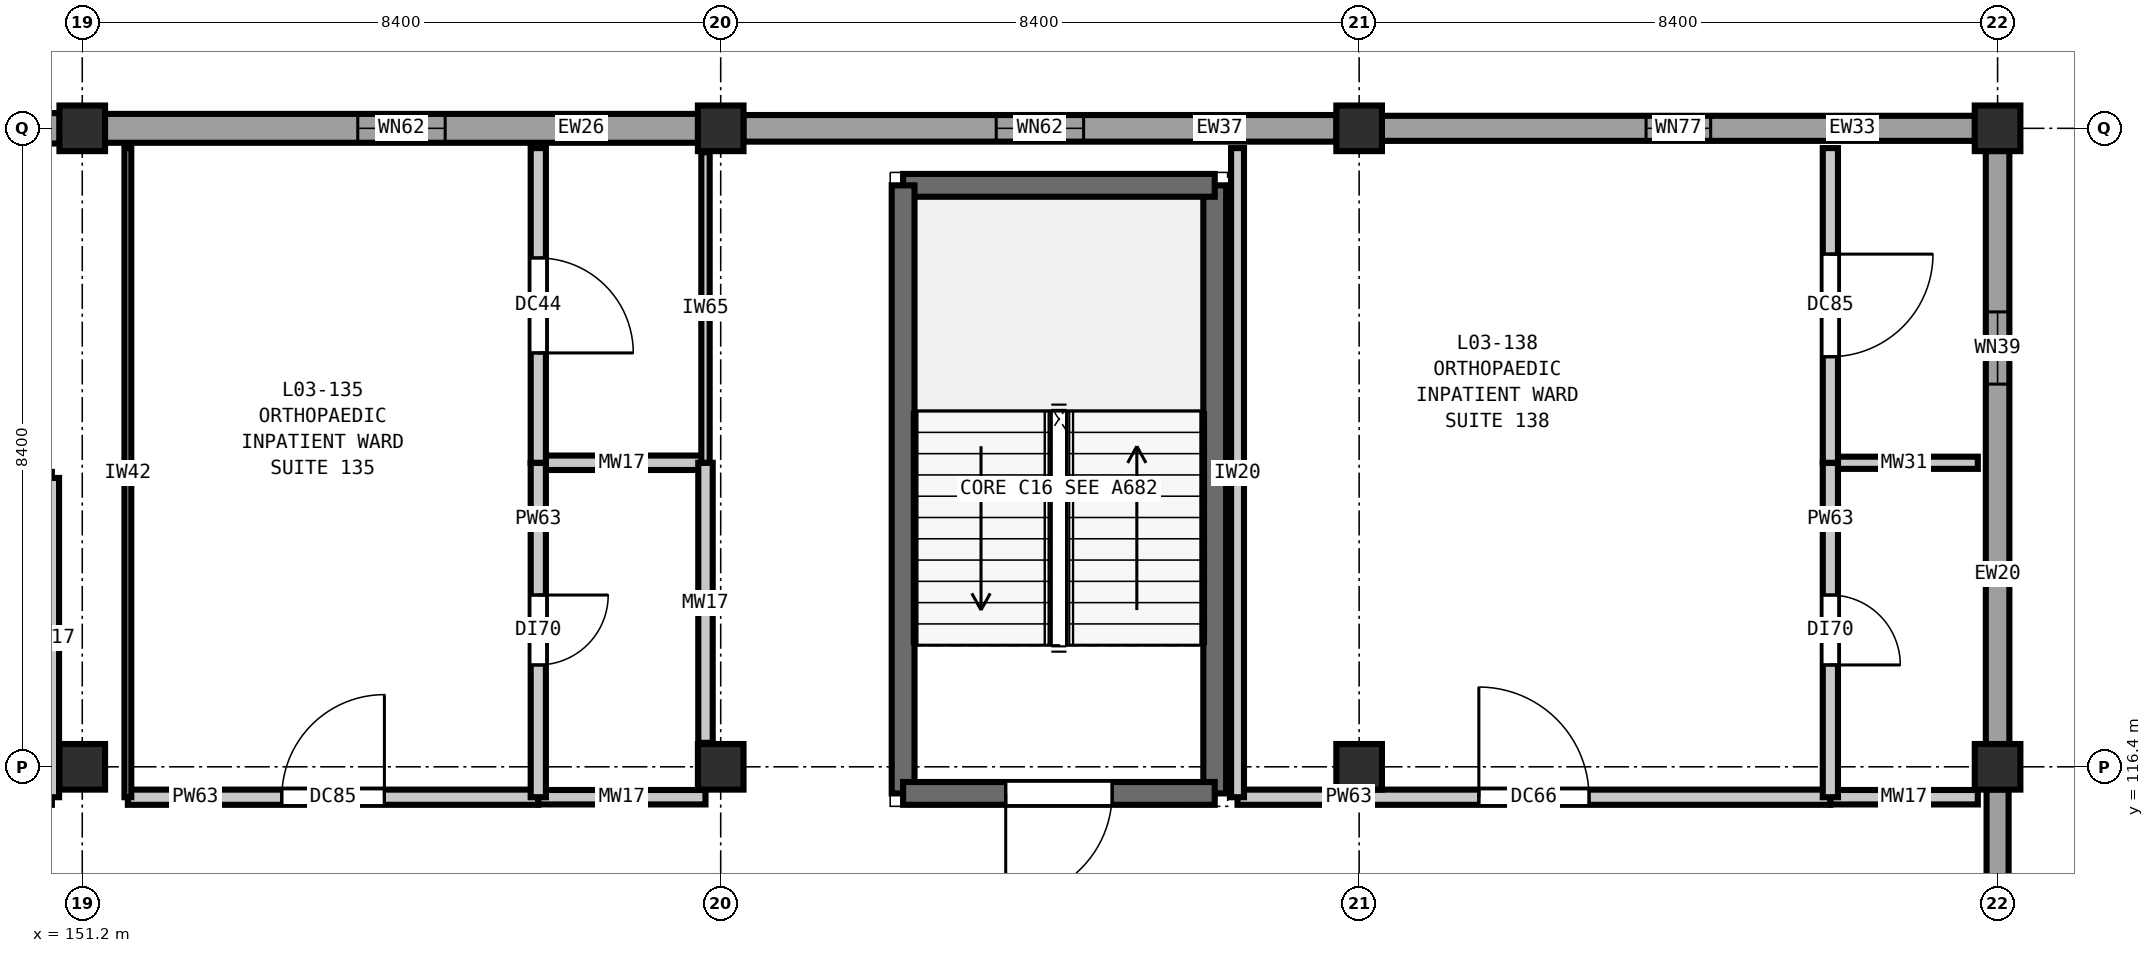
"""IFC4 building model, lengths in metres.
Left out: names, types, materials, properties, quantities, classifications, styles, units other than length and angle.
Written with IfcOpenShell. Run it as: python <this file> out.ifc"""

import sys

from ifc_helpers import new_model, si_unit, direction, frame, frame_2d, origin, origin_2d, place, context, subcontext, project, spatial, rectangle, extrude, element, fill, save


model = new_model("IFC4")
c1 = context("Model", 3, precision=1e-05, world=origin(), true_north=direction((0.0, 1.0)))
c2 = subcontext(c1, "Body", "Model", "MODEL_VIEW")
j1 = project(units=[si_unit("LENGTHUNIT", "METRE"), si_unit("PLANEANGLEUNIT", "RADIAN")], contexts=[c1])
p1 = place(None, origin())
s1 = spatial("IfcSite", under=j1, at=p1, CompositionType="ELEMENT")
p2 = place(p1, origin())
s2 = spatial("IfcBuilding", under=s1, at=p2, CompositionType="ELEMENT")
p3 = place(p2, frame((0.0, 0.0, 16.2)))
s3 = spatial("IfcBuildingStorey", under=s2, at=p3, CompositionType="ELEMENT", Elevation=16.2)
for number, where, z_axis, x_axis in (
    (1, (151.2, 116.4, 0.0), (0.0, 0.0, 1.0), (1.0, 0.0, 0.0)),
    (2, (151.2, 124.8, 0.0), (0.0, 0.0, 1.0), (1.0, 0.0, 0.0)),
    (3, (159.6, 116.4, 0.0), (0.0, 0.0, 1.0), (1.0, 0.0, 0.0)),
    (4, (159.6, 124.8, 0.0), (0.0, 0.0, 1.0), (1.0, 0.0, 0.0)),
    (5, (168.0, 116.4, 0.0), (0.0, 0.0, 1.0), (1.0, 0.0, 0.0)),
    (6, (168.0, 124.8, 0.0), (0.0, 0.0, 1.0), (1.0, 0.0, 0.0)),
    (7, (176.4, 116.4, 0.0), (0.0, 0.0, 1.0), (1.0, 0.0, 0.0)),
    (8, (176.4, 124.8, 0.0), (0.0, 0.0, 1.0), (1.0, 0.0, 0.0)),
):
    element("IfcColumn", number, at=place(p3, frame(where, z_axis=z_axis, x_axis=x_axis)), inside=s3, PredefinedType="COLUMN", context=c2, shape_type="SweptSolid", body=[
        extrude(rectangle(XDim=0.6, YDim=0.6, at=origin_2d()), origin(), (0.0, 0.0, 1.0), 4.2),
    ])
p4 = place(p3, frame((143.098, 124.8, 0.0), z_axis=(0.0, 0.0, 1.0), x_axis=(1.0, 0.0, 0.0)))
e9 = element("IfcWall", 9, at=p4, inside=s3, PredefinedType="SOLIDWALL", context=c2, shape_type="SweptSolid", body=[
    extrude(rectangle(XDim=7.804, YDim=0.4, at=frame_2d((3.902, 0.0))), origin(), (0.0, 0.0, 1.0), 3.48),
])
p5 = place(p4, frame((3.327, 0.0, 0.9)))
e10 = element("IfcOpeningElement", 10, at=p5, cuts=e9, PredefinedType="OPENING", context=c2, shape_type="SweptSolid", body=[
    extrude(rectangle(XDim=1.15, YDim=1.4, at=frame_2d((0.575, 0.7))), frame((0.0, 0.21, 0.0), z_axis=(0.0, -1.0, 0.0), x_axis=(1.0, 0.0, 0.0)), (0.0, 0.0, 1.0), 0.42),
])
p6 = place(p3, frame((151.498, 124.8, 0.0), z_axis=(0.0, 0.0, 1.0), x_axis=(1.0, 0.0, 0.0)))
e11 = element("IfcWall", 11, at=p6, inside=s3, PredefinedType="SOLIDWALL", context=c2, shape_type="SweptSolid", body=[
    extrude(rectangle(XDim=7.804, YDim=0.38, at=frame_2d((3.902, 0.0))), origin(), (0.0, 0.0, 1.0), 3.48),
])
p7 = place(p6, frame((3.327, 0.0, 0.9)))
e12 = element("IfcOpeningElement", 12, at=p7, cuts=e11, PredefinedType="OPENING", context=c2, shape_type="SweptSolid", body=[
    extrude(rectangle(XDim=1.15, YDim=1.4, at=frame_2d((0.575, 0.7))), frame((0.0, 0.2, 0.0), z_axis=(0.0, -1.0, 0.0), x_axis=(1.0, 0.0, 0.0)), (0.0, 0.0, 1.0), 0.4),
])
p8 = place(p3, frame((159.898, 124.8, 0.0), z_axis=(0.0, 0.0, 1.0), x_axis=(1.0, 0.0, 0.0)))
e13 = element("IfcWall", 13, at=p8, inside=s3, PredefinedType="SOLIDWALL", context=c2, shape_type="SweptSolid", body=[
    extrude(rectangle(XDim=7.804, YDim=0.35, at=frame_2d((3.902, 0.0))), origin(), (0.0, 0.0, 1.0), 3.48),
])
p9 = place(p8, frame((3.327, 0.0, 0.9)))
e14 = element("IfcOpeningElement", 14, at=p9, cuts=e13, PredefinedType="OPENING", context=c2, shape_type="SweptSolid", body=[
    extrude(rectangle(XDim=1.15, YDim=1.4, at=frame_2d((0.575, 0.7))), frame((0.0, 0.185, 0.0), z_axis=(0.0, -1.0, 0.0), x_axis=(1.0, 0.0, 0.0)), (0.0, 0.0, 1.0), 0.37),
])
p10 = place(p3, frame((168.298, 124.8, 0.0), z_axis=(0.0, 0.0, 1.0), x_axis=(1.0, 0.0, 0.0)))
e15 = element("IfcWall", 15, at=p10, inside=s3, PredefinedType="SOLIDWALL", context=c2, shape_type="SweptSolid", body=[
    extrude(rectangle(XDim=7.804, YDim=0.33, at=frame_2d((3.902, 0.0))), origin(), (0.0, 0.0, 1.0), 3.48),
])
p11 = place(p10, frame((3.477, 0.0, 0.9)))
e16 = element("IfcOpeningElement", 16, at=p11, cuts=e15, PredefinedType="OPENING", context=c2, shape_type="SweptSolid", body=[
    extrude(rectangle(XDim=0.85, YDim=1.4, at=frame_2d((0.425, 0.7))), frame((0.0, 0.175, 0.0), z_axis=(0.0, -1.0, 0.0), x_axis=(1.0, 0.0, 0.0)), (0.0, 0.0, 1.0), 0.35),
])
p12 = place(p3, frame((176.4, 124.502, 0.0), z_axis=(0.0, 0.0, 1.0), x_axis=(0.0, -1.0, 0.0)))
e17 = element("IfcWall", 17, at=p12, inside=s3, PredefinedType="SOLIDWALL", context=c2, shape_type="SweptSolid", body=[
    extrude(rectangle(XDim=7.804, YDim=0.31, at=frame_2d((3.902, 0.0))), origin(), (0.0, 0.0, 1.0), 3.48),
])
p13 = place(p12, frame((2.117, 0.0, 0.9)))
e18 = element("IfcOpeningElement", 18, at=p13, cuts=e17, PredefinedType="OPENING", context=c2, shape_type="SweptSolid", body=[
    extrude(rectangle(XDim=0.95, YDim=1.4, at=frame_2d((0.475, 0.7))), frame((0.0, 0.165, 0.0), z_axis=(0.0, -1.0, 0.0), x_axis=(1.0, 0.0, 0.0)), (0.0, 0.0, 1.0), 0.33),
])
p14 = place(p3, frame((176.4, 116.102, 0.0), z_axis=(0.0, 0.0, 1.0), x_axis=(0.0, -1.0, 0.0)))
e19 = element("IfcWall", 19, at=p14, inside=s3, PredefinedType="SOLIDWALL", context=c2, shape_type="SweptSolid", body=[
    extrude(rectangle(XDim=6.604, YDim=0.29, at=frame_2d((3.302, 0.0))), origin(), (0.0, 0.0, 1.0), 3.48),
])
p15 = place(p14, frame((3.801, 0.0, 0.9)))
e20 = element("IfcOpeningElement", 20, at=p15, cuts=e19, PredefinedType="OPENING", context=c2, shape_type="SweptSolid", body=[
    extrude(rectangle(XDim=1.05, YDim=1.4, at=frame_2d((0.525, 0.7))), frame((0.0, 0.155, 0.0), z_axis=(0.0, -1.0, 0.0), x_axis=(1.0, 0.0, 0.0)), (0.0, 0.0, 1.0), 0.31),
])
p16 = place(p3, frame((166.1, 116.05, 0.0), z_axis=(0.0, 0.0, 1.0), x_axis=(0.0, 1.0, 0.0)))
e21 = element("IfcWall", 21, at=p16, inside=s3, PredefinedType="SHEAR", context=c2, shape_type="SweptSolid", body=[
    extrude(rectangle(XDim=8.0, YDim=0.3, at=frame_2d((4.0, 0.0))), origin(), (0.0, 0.0, 1.0), 4.2),
])
p17 = place(p3, frame((166.1, 124.05, 0.0), z_axis=(0.0, 0.0, 1.0), x_axis=(-1.0, 0.0, 0.0)))
e22 = element("IfcWall", 22, at=p17, inside=s3, PredefinedType="SHEAR", context=c2, shape_type="SweptSolid", body=[
    extrude(rectangle(XDim=4.1, YDim=0.3, at=frame_2d((2.05, 0.0))), origin(), (0.0, 0.0, 1.0), 4.2),
])
p18 = place(p3, frame((162.0, 124.05, 0.0), z_axis=(0.0, 0.0, 1.0), x_axis=(0.0, -1.0, 0.0)))
e23 = element("IfcWall", 23, at=p18, inside=s3, PredefinedType="SHEAR", context=c2, shape_type="SweptSolid", body=[
    extrude(rectangle(XDim=8.0, YDim=0.3, at=frame_2d((4.0, 0.0))), origin(), (0.0, 0.0, 1.0), 4.2),
])
p19 = place(p3, frame((162.0, 116.05, 0.0), z_axis=(0.0, 0.0, 1.0), x_axis=(1.0, 0.0, 0.0)))
e24 = element("IfcWall", 24, at=p19, inside=s3, PredefinedType="SHEAR", context=c2, shape_type="SweptSolid", body=[
    extrude(rectangle(XDim=4.1, YDim=0.3, at=frame_2d((2.05, 0.0))), origin(), (0.0, 0.0, 1.0), 4.2),
])
p20 = place(p19, frame((1.35, 0.0, 0.0)))
e25 = element("IfcOpeningElement", 25, at=p20, cuts=e24, PredefinedType="OPENING", context=c2, shape_type="SweptSolid", body=[
    extrude(rectangle(XDim=1.4, YDim=2.2, at=frame_2d((0.7, 1.1))), frame((0.0, 0.16, 0.0), z_axis=(0.0, -1.0, 0.0), x_axis=(1.0, 0.0, 0.0)), (0.0, 0.0, 1.0), 0.32),
])
p21 = place(p3, frame((151.8, 116.0, 0.0), z_axis=(0.0, 0.0, 1.0), x_axis=(1.0, 0.0, 0.0)))
e26 = element("IfcWall", 26, at=p21, inside=s3, PredefinedType="PARTITIONING", context=c2, shape_type="SweptSolid", body=[
    extrude(rectangle(XDim=5.4, YDim=0.2, at=frame_2d((2.7, 0.0))), origin(), (0.0, 0.0, 1.0), 3.89),
])
p22 = place(p21, frame((2.025, 0.0, 0.0)))
e27 = element("IfcOpeningElement", 27, at=p22, cuts=e26, PredefinedType="OPENING", context=c2, shape_type="SweptSolid", body=[
    extrude(rectangle(XDim=1.35, YDim=2.2, at=frame_2d((0.675, 1.1))), frame((0.0, 0.11, 0.0), z_axis=(0.0, -1.0, 0.0), x_axis=(1.0, 0.0, 0.0)), (0.0, 0.0, 1.0), 0.22),
])
p23 = place(p3, frame((157.2, 116.0, 0.0), z_axis=(0.0, 0.0, 1.0), x_axis=(1.0, 0.0, 0.0)))
e28 = element("IfcWall", 28, at=p23, inside=s3, PredefinedType="PLUMBINGWALL", context=c2, shape_type="SweptSolid", body=[
    extrude(rectangle(XDim=2.2, YDim=0.19, at=frame_2d((1.1, 0.0))), origin(), (0.0, 0.0, 1.0), 3.89),
])
p24 = place(p3, frame((166.4, 116.0, 0.0), z_axis=(0.0, 0.0, 1.0), x_axis=(1.0, 0.0, 0.0)))
e29 = element("IfcWall", 29, at=p24, inside=s3, PredefinedType="PARTITIONING", context=c2, shape_type="SweptSolid", body=[
    extrude(rectangle(XDim=7.8, YDim=0.2, at=frame_2d((3.9, 0.0))), origin(), (0.0, 0.0, 1.0), 3.89),
])
p25 = place(p24, frame((3.175, 0.0, 0.0)))
e30 = element("IfcOpeningElement", 30, at=p25, cuts=e29, PredefinedType="OPENING", context=c2, shape_type="SweptSolid", body=[
    extrude(rectangle(XDim=1.45, YDim=2.25, at=frame_2d((0.725, 1.125))), frame((0.0, 0.11, 0.0), z_axis=(0.0, -1.0, 0.0), x_axis=(1.0, 0.0, 0.0)), (0.0, 0.0, 1.0), 0.22),
])
p26 = place(p3, frame((174.2, 116.0, 0.0), z_axis=(0.0, 0.0, 1.0), x_axis=(1.0, 0.0, 0.0)))
e31 = element("IfcWall", 31, at=p26, inside=s3, PredefinedType="PLUMBINGWALL", context=c2, shape_type="SweptSolid", body=[
    extrude(rectangle(XDim=1.94, YDim=0.19, at=frame_2d((0.97, 0.0))), origin(), (0.0, 0.0, 1.0), 3.89),
])
p27 = place(p3, frame((157.2, 120.4, 0.0), z_axis=(0.0, 0.0, 1.0), x_axis=(1.0, 0.0, 0.0)))
e32 = element("IfcWall", 32, at=p27, inside=s3, PredefinedType="PLUMBINGWALL", context=c2, shape_type="SweptSolid", body=[
    extrude(rectangle(XDim=2.2, YDim=0.19, at=frame_2d((1.1, 0.0))), origin(), (0.0, 0.0, 1.0), 3.89),
])
p28 = place(p3, frame((174.2, 120.4, 0.0), z_axis=(0.0, 0.0, 1.0), x_axis=(1.0, 0.0, 0.0)))
e33 = element("IfcWall", 33, at=p28, inside=s3, PredefinedType="PLUMBINGWALL", context=c2, shape_type="SweptSolid", body=[
    extrude(rectangle(XDim=1.94, YDim=0.16, at=frame_2d((0.97, 0.0))), origin(), (0.0, 0.0, 1.0), 3.89),
])
p29 = place(p3, frame((150.8, 116.0, 0.0), z_axis=(0.0, 0.0, 1.0), x_axis=(0.0, 1.0, 0.0)))
e34 = element("IfcWall", 34, at=p29, inside=s3, PredefinedType="PLUMBINGWALL", context=c2, shape_type="SweptSolid", body=[
    extrude(rectangle(XDim=4.2, YDim=0.19, at=frame_2d((2.1, 0.0))), origin(), (0.0, 0.0, 1.0), 3.89),
])
p30 = place(p3, frame((151.8, 116.0, 0.0), z_axis=(0.0, 0.0, 1.0), x_axis=(0.0, 1.0, 0.0)))
e35 = element("IfcWall", 35, at=p30, inside=s3, PredefinedType="PARTITIONING", context=c2, shape_type="SweptSolid", body=[
    extrude(rectangle(XDim=8.54, YDim=0.09, at=frame_2d((4.27, 0.0))), origin(), (0.0, 0.0, 1.0), 3.89),
])
p31 = place(p3, frame((157.2, 116.0, 0.0), z_axis=(0.0, 0.0, 1.0), x_axis=(0.0, 1.0, 0.0)))
e36 = element("IfcWall", 36, at=p31, inside=s3, PredefinedType="PARTITIONING", context=c2, shape_type="SweptSolid", body=[
    extrude(rectangle(XDim=4.4, YDim=0.2, at=frame_2d((2.2, 0.0))), origin(), (0.0, 0.0, 1.0), 3.89),
])
p32 = place(p31, frame((1.74, 0.0, 0.0)))
e37 = element("IfcOpeningElement", 37, at=p32, cuts=e36, PredefinedType="OPENING", context=c2, shape_type="SweptSolid", body=[
    extrude(rectangle(XDim=0.92, YDim=2.1, at=frame_2d((0.46, 1.05))), frame((0.0, 0.11, 0.0), z_axis=(0.0, -1.0, 0.0), x_axis=(1.0, 0.0, 0.0)), (0.0, 0.0, 1.0), 0.22),
])
p33 = place(p3, frame((157.2, 120.4, 0.0), z_axis=(0.0, 0.0, 1.0), x_axis=(0.0, 1.0, 0.0)))
e38 = element("IfcWall", 38, at=p33, inside=s3, PredefinedType="PARTITIONING", context=c2, shape_type="SweptSolid", body=[
    extrude(rectangle(XDim=4.14, YDim=0.2, at=frame_2d((2.07, 0.0))), origin(), (0.0, 0.0, 1.0), 3.89),
])
p34 = place(p33, frame((1.445, 0.0, 0.0)))
e39 = element("IfcOpeningElement", 39, at=p34, cuts=e38, PredefinedType="OPENING", context=c2, shape_type="SweptSolid", body=[
    extrude(rectangle(XDim=1.25, YDim=2.15, at=frame_2d((0.625, 1.075))), frame((0.0, 0.11, 0.0), z_axis=(0.0, -1.0, 0.0), x_axis=(1.0, 0.0, 0.0)), (0.0, 0.0, 1.0), 0.22),
])
p35 = place(p3, frame((159.4, 116.715, 0.0), z_axis=(0.0, 0.0, 1.0), x_axis=(0.0, 1.0, 0.0)))
e40 = element("IfcWall", 40, at=p35, inside=s3, PredefinedType="PLUMBINGWALL", context=c2, shape_type="SweptSolid", body=[
    extrude(rectangle(XDim=3.685, YDim=0.19, at=frame_2d((1.842, 0.0))), origin(), (0.0, 0.0, 1.0), 3.585),
])
p36 = place(p3, frame((159.4, 120.4, 0.0), z_axis=(0.0, 0.0, 1.0), x_axis=(0.0, 1.0, 0.0)))
e41 = element("IfcWall", 41, at=p36, inside=s3, PredefinedType="PARTITIONING", context=c2, shape_type="SweptSolid", body=[
    extrude(rectangle(XDim=4.085, YDim=0.11, at=frame_2d((2.042, 0.0))), origin(), (0.0, 0.0, 1.0), 3.585),
])
p37 = place(p3, frame((166.4, 116.0, 0.0), z_axis=(0.0, 0.0, 1.0), x_axis=(0.0, 1.0, 0.0)))
e42 = element("IfcWall", 42, at=p37, inside=s3, PredefinedType="PARTITIONING", context=c2, shape_type="SweptSolid", body=[
    extrude(rectangle(XDim=8.54, YDim=0.17, at=frame_2d((4.27, 0.0))), origin(), (0.0, 0.0, 1.0), 3.89),
])
p38 = place(p3, frame((174.2, 116.0, 0.0), z_axis=(0.0, 0.0, 1.0), x_axis=(0.0, 1.0, 0.0)))
e43 = element("IfcWall", 43, at=p38, inside=s3, PredefinedType="PARTITIONING", context=c2, shape_type="SweptSolid", body=[
    extrude(rectangle(XDim=4.4, YDim=0.2, at=frame_2d((2.2, 0.0))), origin(), (0.0, 0.0, 1.0), 3.89),
])
p39 = place(p38, frame((1.74, 0.0, 0.0)))
e44 = element("IfcOpeningElement", 44, at=p39, cuts=e43, PredefinedType="OPENING", context=c2, shape_type="SweptSolid", body=[
    extrude(rectangle(XDim=0.92, YDim=2.1, at=frame_2d((0.46, 1.05))), frame((0.0, 0.11, 0.0), z_axis=(0.0, -1.0, 0.0), x_axis=(1.0, 0.0, 0.0)), (0.0, 0.0, 1.0), 0.22),
])
p40 = place(p3, frame((174.2, 120.4, 0.0), z_axis=(0.0, 0.0, 1.0), x_axis=(0.0, 1.0, 0.0)))
e45 = element("IfcWall", 45, at=p40, inside=s3, PredefinedType="PARTITIONING", context=c2, shape_type="SweptSolid", body=[
    extrude(rectangle(XDim=4.14, YDim=0.2, at=frame_2d((2.07, 0.0))), origin(), (0.0, 0.0, 1.0), 3.89),
])
p41 = place(p40, frame((1.395, 0.0, 0.0)))
e46 = element("IfcOpeningElement", 46, at=p41, cuts=e45, PredefinedType="OPENING", context=c2, shape_type="SweptSolid", body=[
    extrude(rectangle(XDim=1.35, YDim=2.2, at=frame_2d((0.675, 1.1))), frame((0.0, 0.11, 0.0), z_axis=(0.0, -1.0, 0.0), x_axis=(1.0, 0.0, 0.0)), (0.0, 0.0, 1.0), 0.22),
])
p42 = place(p7, origin())
e47 = element("IfcWindow", 47, at=p42, inside=s3, PartitioningType="SINGLE_PANEL", PredefinedType="WINDOW", context=c2, shape_type="SweptSolid", body=[
    extrude(rectangle(XDim=1.15, YDim=1.4, at=frame_2d((0.575, 0.7))), frame((0.0, 0.03, 0.0), z_axis=(0.0, -1.0, 0.0), x_axis=(1.0, 0.0, 0.0)), (0.0, 0.0, 1.0), 0.06),
])
fill(e12, e47)
p43 = place(p9, origin())
e48 = element("IfcWindow", 48, at=p43, inside=s3, PartitioningType="SINGLE_PANEL", PredefinedType="WINDOW", context=c2, shape_type="SweptSolid", body=[
    extrude(rectangle(XDim=1.15, YDim=1.4, at=frame_2d((0.575, 0.7))), frame((0.0, 0.03, 0.0), z_axis=(0.0, -1.0, 0.0), x_axis=(1.0, 0.0, 0.0)), (0.0, 0.0, 1.0), 0.06),
])
fill(e14, e48)
p44 = place(p11, origin())
e49 = element("IfcWindow", 49, at=p44, inside=s3, PartitioningType="SINGLE_PANEL", PredefinedType="WINDOW", context=c2, shape_type="SweptSolid", body=[
    extrude(rectangle(XDim=0.85, YDim=1.4, at=frame_2d((0.425, 0.7))), frame((0.0, 0.03, 0.0), z_axis=(0.0, -1.0, 0.0), x_axis=(1.0, 0.0, 0.0)), (0.0, 0.0, 1.0), 0.06),
])
fill(e16, e49)
p45 = place(p13, origin())
e50 = element("IfcWindow", 50, at=p45, inside=s3, PartitioningType="SINGLE_PANEL", PredefinedType="WINDOW", context=c2, shape_type="SweptSolid", body=[
    extrude(rectangle(XDim=0.95, YDim=1.4, at=frame_2d((0.475, 0.7))), frame((0.0, 0.03, 0.0), z_axis=(0.0, -1.0, 0.0), x_axis=(1.0, 0.0, 0.0)), (0.0, 0.0, 1.0), 0.06),
])
fill(e18, e50)
p46 = place(p20, frame((1.4, 0.0, 0.0), z_axis=(0.0, 0.0, 1.0), x_axis=(-1.0, 0.0, 0.0)))
e51 = element("IfcDoor", 51, at=p46, inside=s3, OperationType="SINGLE_SWING_RIGHT", PredefinedType="DOOR", context=c2, shape_type="SweptSolid", body=[
    extrude(rectangle(XDim=1.4, YDim=2.2, at=frame_2d((0.7, 1.1))), frame((0.0, 0.025, 0.0), z_axis=(0.0, -1.0, 0.0), x_axis=(1.0, 0.0, 0.0)), (0.0, 0.0, 1.0), 0.05),
])
fill(e25, e51)
p47 = place(p22, origin())
e52 = element("IfcDoor", 52, at=p47, inside=s3, OperationType="SINGLE_SWING_RIGHT", PredefinedType="DOOR", context=c2, shape_type="SweptSolid", body=[
    extrude(rectangle(XDim=1.35, YDim=2.2, at=frame_2d((0.675, 1.1))), frame((0.0, 0.025, 0.0), z_axis=(0.0, -1.0, 0.0), x_axis=(1.0, 0.0, 0.0)), (0.0, 0.0, 1.0), 0.05),
])
fill(e27, e52)
p48 = place(p25, origin())
e53 = element("IfcDoor", 53, at=p48, inside=s3, OperationType="SINGLE_SWING_LEFT", PredefinedType="DOOR", context=c2, shape_type="SweptSolid", body=[
    extrude(rectangle(XDim=1.45, YDim=2.25, at=frame_2d((0.725, 1.125))), frame((0.0, 0.025, 0.0), z_axis=(0.0, -1.0, 0.0), x_axis=(1.0, 0.0, 0.0)), (0.0, 0.0, 1.0), 0.05),
])
fill(e30, e53)
p49 = place(p32, frame((0.92, 0.0, 0.0), z_axis=(0.0, 0.0, 1.0), x_axis=(-1.0, 0.0, 0.0)))
e54 = element("IfcDoor", 54, at=p49, inside=s3, OperationType="SINGLE_SWING_LEFT", PredefinedType="DOOR", context=c2, shape_type="SweptSolid", body=[
    extrude(rectangle(XDim=0.92, YDim=2.1, at=frame_2d((0.46, 1.05))), frame((0.0, 0.025, 0.0), z_axis=(0.0, -1.0, 0.0), x_axis=(1.0, 0.0, 0.0)), (0.0, 0.0, 1.0), 0.05),
])
fill(e37, e54)
p50 = place(p34, frame((1.25, 0.0, 0.0), z_axis=(0.0, 0.0, 1.0), x_axis=(-1.0, 0.0, 0.0)))
e55 = element("IfcDoor", 55, at=p50, inside=s3, OperationType="SINGLE_SWING_RIGHT", PredefinedType="DOOR", context=c2, shape_type="SweptSolid", body=[
    extrude(rectangle(XDim=1.25, YDim=2.15, at=frame_2d((0.625, 1.075))), frame((0.0, 0.025, 0.0), z_axis=(0.0, -1.0, 0.0), x_axis=(1.0, 0.0, 0.0)), (0.0, 0.0, 1.0), 0.05),
])
fill(e39, e55)
p51 = place(p39, frame((0.92, 0.0, 0.0), z_axis=(0.0, 0.0, 1.0), x_axis=(-1.0, 0.0, 0.0)))
e56 = element("IfcDoor", 56, at=p51, inside=s3, OperationType="SINGLE_SWING_RIGHT", PredefinedType="DOOR", context=c2, shape_type="SweptSolid", body=[
    extrude(rectangle(XDim=0.92, YDim=2.1, at=frame_2d((0.46, 1.05))), frame((0.0, 0.025, 0.0), z_axis=(0.0, -1.0, 0.0), x_axis=(1.0, 0.0, 0.0)), (0.0, 0.0, 1.0), 0.05),
])
fill(e44, e56)
p52 = place(p41, frame((1.35, 0.0, 0.0), z_axis=(0.0, 0.0, 1.0), x_axis=(-1.0, 0.0, 0.0)))
e57 = element("IfcDoor", 57, at=p52, inside=s3, OperationType="SINGLE_SWING_LEFT", PredefinedType="DOOR", context=c2, shape_type="SweptSolid", body=[
    extrude(rectangle(XDim=1.35, YDim=2.2, at=frame_2d((0.675, 1.1))), frame((0.0, 0.025, 0.0), z_axis=(0.0, -1.0, 0.0), x_axis=(1.0, 0.0, 0.0)), (0.0, 0.0, 1.0), 0.05),
])
fill(e46, e57)
save(model, sys.argv[1])
